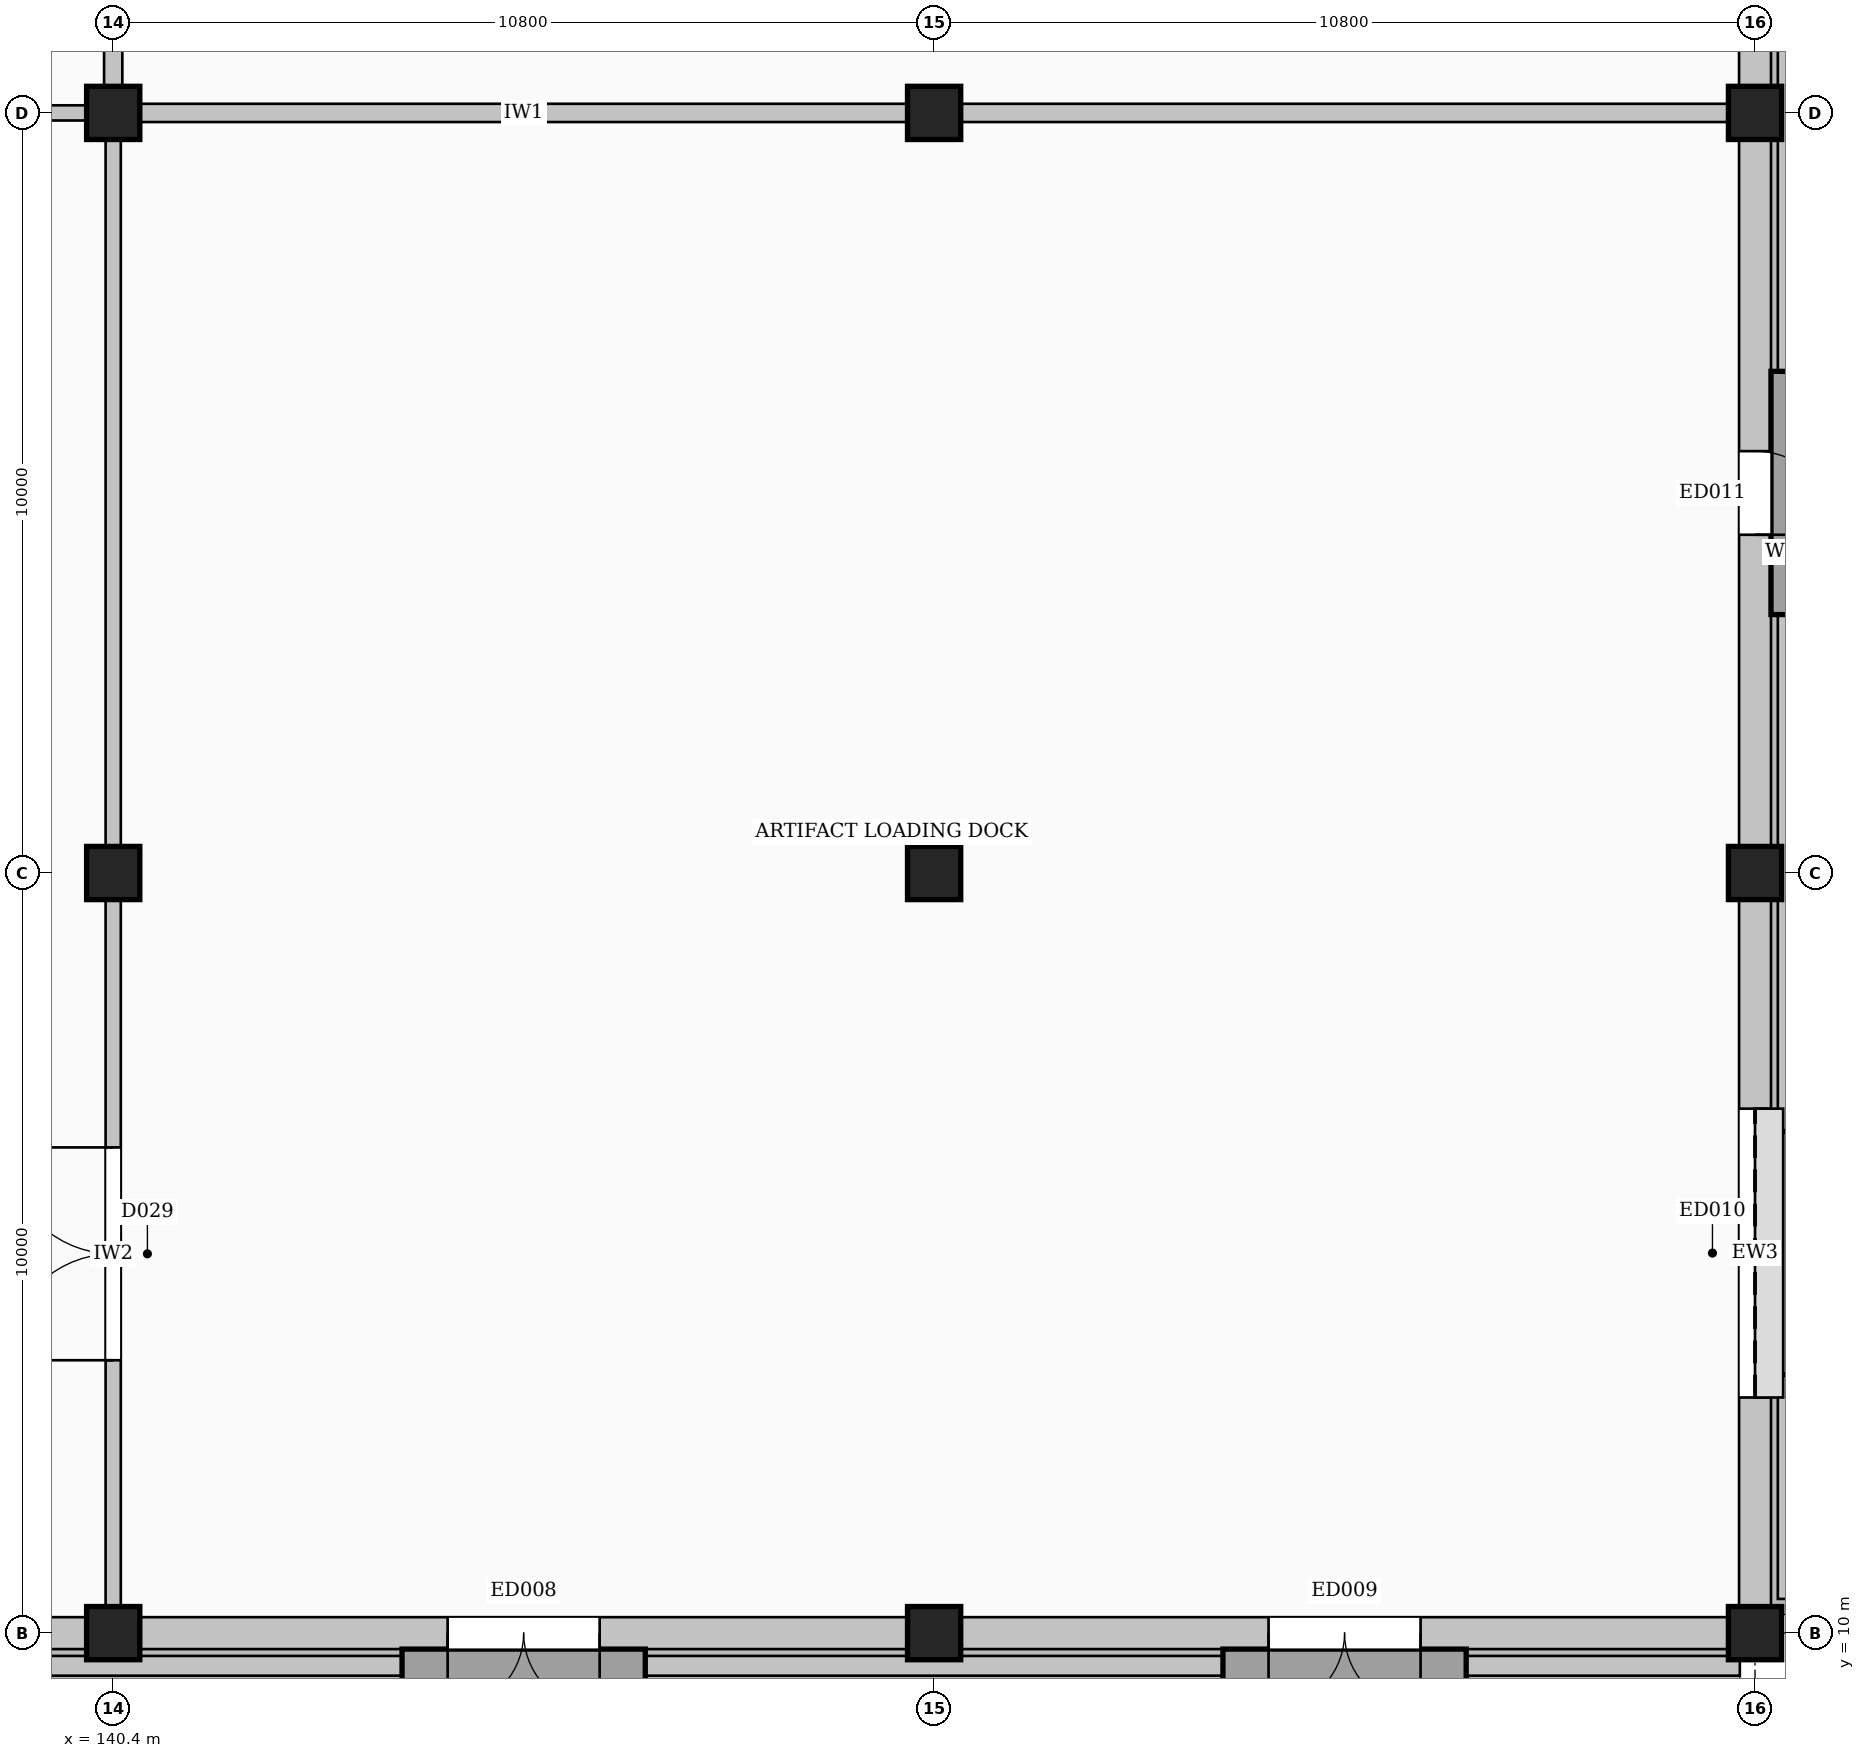
"""IFC4 building model, lengths in metres.
Left out: names, types, materials, properties, quantities, classifications, styles, units other than length and angle.
Written with IfcOpenShell. Run it as: python <this file> out.ifc"""

import sys

from ifc_helpers import new_model, si_unit, direction, frame, frame_2d, origin, origin_2d, place, context, subcontext, project, spatial, rectangle, extrude, element, fill, save


model = new_model("IFC4")
c1 = context("Model", 3, precision=1e-05, world=origin(), true_north=direction((0.0, 1.0)))
c2 = subcontext(c1, "Body", "Model", "MODEL_VIEW")
j1 = project(units=[si_unit("LENGTHUNIT", "METRE"), si_unit("PLANEANGLEUNIT", "RADIAN")], contexts=[c1])
p1 = place(None, origin())
s1 = spatial("IfcSite", under=j1, at=p1, CompositionType="ELEMENT")
p2 = place(p1, origin())
s2 = spatial("IfcBuilding", under=s1, at=p2, CompositionType="ELEMENT")
p3 = place(p2, origin())
s3 = spatial("IfcBuildingStorey", under=s2, at=p3, CompositionType="ELEMENT", Elevation=0.0)
for number, where, z_axis, x_axis in (
    (1, (140.4, 10.0, 0.0), (0.0, 0.0, 1.0), (1.0, 0.0, 0.0)),
    (2, (140.4, 20.0, 0.0), (0.0, 0.0, 1.0), (1.0, 0.0, 0.0)),
    (3, (140.4, 30.0, 0.0), (0.0, 0.0, 1.0), (1.0, 0.0, 0.0)),
    (4, (151.2, 10.0, 0.0), (0.0, 0.0, 1.0), (1.0, 0.0, 0.0)),
    (5, (151.2, 20.0, 0.0), (0.0, 0.0, 1.0), (1.0, 0.0, 0.0)),
    (6, (151.2, 30.0, 0.0), (0.0, 0.0, 1.0), (1.0, 0.0, 0.0)),
    (7, (162.0, 10.0, 0.0), (0.0, 0.0, 1.0), (1.0, 0.0, 0.0)),
    (8, (162.0, 20.0, 0.0), (0.0, 0.0, 1.0), (1.0, 0.0, 0.0)),
    (9, (162.0, 30.0, 0.0), (0.0, 0.0, 1.0), (1.0, 0.0, 0.0)),
):
    element("IfcColumn", number, at=place(p3, frame(where, z_axis=z_axis, x_axis=x_axis)), inside=s3, PredefinedType="COLUMN", context=c2, shape_type="SweptSolid", body=[
        extrude(rectangle(XDim=0.7, YDim=0.7, at=origin_2d()), origin(), (0.0, 0.0, 1.0), 4.8),
    ])
p4 = place(p3, frame((108.2, 9.57, -1.38), z_axis=(0.0, 0.0, 1.0), x_axis=(1.0, 0.0, 0.0)))
e10 = element("IfcWall", 10, at=p4, inside=s3, PredefinedType="PARAPET", context=c2, shape_type="SweptSolid", body=[
    extrude(rectangle(XDim=53.6, YDim=0.26, at=frame_2d((26.8, 0.0))), origin(), (0.0, 0.0, 1.0), 1.36),
])
p5 = place(p3, frame((162.43, 10.45, -1.38), z_axis=(0.0, 0.0, 1.0), x_axis=(0.0, 1.0, 0.0)))
e11 = element("IfcWall", 11, at=p5, inside=s3, PredefinedType="PARAPET", context=c2, shape_type="SweptSolid", body=[
    extrude(rectangle(XDim=27.55, YDim=0.26, at=frame_2d((13.775, 0.0))), origin(), (0.0, 0.0, 1.0), 2.78),
])
p6 = place(p3, frame((129.745, 10.0, 0.0), z_axis=(0.0, 0.0, 1.0), x_axis=(1.0, 0.0, 0.0)))
e12 = element("IfcWall", 12, at=p6, inside=s3, PredefinedType="STANDARD", context=c2, shape_type="SweptSolid", body=[
    extrude(rectangle(XDim=10.51, YDim=0.42, at=frame_2d((5.255, 0.0))), origin(), (0.0, 0.0, 1.0), 3.819),
])
p7 = place(p6, frame((4.255, 0.0, 0.0)))
e13 = element("IfcOpeningElement", 13, at=p7, cuts=e12, PredefinedType="OPENING", context=c2, shape_type="SweptSolid", body=[
    extrude(rectangle(XDim=2.0, YDim=2.3, at=frame_2d((1.0, 1.15))), frame((0.0, 0.22, 0.0), z_axis=(0.0, -1.0, 0.0), x_axis=(1.0, 0.0, 0.0)), (0.0, 0.0, 1.0), 0.44),
])
p8 = place(p3, frame((140.545, 10.0, 0.0), z_axis=(0.0, 0.0, 1.0), x_axis=(1.0, 0.0, 0.0)))
e14 = element("IfcWall", 14, at=p8, inside=s3, PredefinedType="STANDARD", context=c2, shape_type="SweptSolid", body=[
    extrude(rectangle(XDim=10.51, YDim=0.42, at=frame_2d((5.255, 0.0))), origin(), (0.0, 0.0, 1.0), 3.819),
])
p9 = place(p8, frame((4.255, 0.0, 0.0)))
e15 = element("IfcOpeningElement", 15, at=p9, cuts=e14, PredefinedType="OPENING", context=c2, shape_type="SweptSolid", body=[
    extrude(rectangle(XDim=2.0, YDim=2.3, at=frame_2d((1.0, 1.15))), frame((0.0, 0.22, 0.0), z_axis=(0.0, -1.0, 0.0), x_axis=(1.0, 0.0, 0.0)), (0.0, 0.0, 1.0), 0.44),
])
p10 = place(p3, frame((151.345, 10.0, 0.0), z_axis=(0.0, 0.0, 1.0), x_axis=(1.0, 0.0, 0.0)))
e16 = element("IfcWall", 16, at=p10, inside=s3, PredefinedType="STANDARD", context=c2, shape_type="SweptSolid", body=[
    extrude(rectangle(XDim=10.51, YDim=0.42, at=frame_2d((5.255, 0.0))), origin(), (0.0, 0.0, 1.0), 4.13),
])
p11 = place(p10, frame((4.255, 0.0, 0.0)))
e17 = element("IfcOpeningElement", 17, at=p11, cuts=e16, PredefinedType="OPENING", context=c2, shape_type="SweptSolid", body=[
    extrude(rectangle(XDim=2.0, YDim=2.3, at=frame_2d((1.0, 1.15))), frame((0.0, 0.22, 0.0), z_axis=(0.0, -1.0, 0.0), x_axis=(1.0, 0.0, 0.0)), (0.0, 0.0, 1.0), 0.44),
])
p12 = place(p3, frame((162.0, 10.145, 0.0), z_axis=(0.0, 0.0, 1.0), x_axis=(0.0, 1.0, 0.0)))
e18 = element("IfcWall", 18, at=p12, inside=s3, PredefinedType="STANDARD", context=c2, shape_type="SweptSolid", body=[
    extrude(rectangle(XDim=9.71, YDim=0.42, at=frame_2d((4.855, 0.0))), origin(), (0.0, 0.0, 1.0), 4.13),
])
p13 = place(p12, frame((2.955, 0.0, 0.0)))
e19 = element("IfcOpeningElement", 19, at=p13, cuts=e18, PredefinedType="OPENING", context=c2, shape_type="SweptSolid", body=[
    extrude(rectangle(XDim=3.8, YDim=4.0, at=frame_2d((1.9, 2.0))), frame((0.0, 0.22, 0.0), z_axis=(0.0, -1.0, 0.0), x_axis=(1.0, 0.0, 0.0)), (0.0, 0.0, 1.0), 0.44),
])
p14 = place(p3, frame((162.0, 20.145, 0.0), z_axis=(0.0, 0.0, 1.0), x_axis=(0.0, 1.0, 0.0)))
e20 = element("IfcWall", 20, at=p14, inside=s3, PredefinedType="STANDARD", context=c2, shape_type="SweptSolid", body=[
    extrude(rectangle(XDim=9.71, YDim=0.42, at=frame_2d((4.855, 0.0))), origin(), (0.0, 0.0, 1.0), 4.13),
])
p15 = place(p14, frame((4.305, 0.0, 0.0)))
e21 = element("IfcOpeningElement", 21, at=p15, cuts=e20, PredefinedType="OPENING", context=c2, shape_type="SweptSolid", body=[
    extrude(rectangle(XDim=1.1, YDim=2.2, at=frame_2d((0.55, 1.1))), frame((0.0, 0.22, 0.0), z_axis=(0.0, -1.0, 0.0), x_axis=(1.0, 0.0, 0.0)), (0.0, 0.0, 1.0), 0.44),
])
p16 = place(p3, frame((162.0, 30.145, 0.0), z_axis=(0.0, 0.0, 1.0), x_axis=(0.0, 1.0, 0.0)))
e22 = element("IfcWall", 22, at=p16, inside=s3, PredefinedType="STANDARD", context=c2, shape_type="SweptSolid", body=[
    extrude(rectangle(XDim=9.71, YDim=0.42, at=frame_2d((4.855, 0.0))), origin(), (0.0, 0.0, 1.0), 4.13),
])
p17 = place(p16, frame((4.055, 0.0, 1.2)))
e23 = element("IfcOpeningElement", 23, at=p17, cuts=e22, PredefinedType="OPENING", context=c2, shape_type="SweptSolid", body=[
    extrude(rectangle(XDim=1.6, YDim=1.8, at=frame_2d((0.8, 0.9))), frame((0.0, 0.22, 0.0), z_axis=(0.0, -1.0, 0.0), x_axis=(1.0, 0.0, 0.0)), (0.0, 0.0, 1.0), 0.44),
])
p18 = place(p3, frame((129.8, 30.0, 0.0), z_axis=(0.0, 0.0, 1.0), x_axis=(1.0, 0.0, 0.0)))
e24 = element("IfcWall", 24, at=p18, inside=s3, PredefinedType="SOLIDWALL", context=c2, shape_type="SweptSolid", body=[
    extrude(rectangle(XDim=10.4, YDim=0.2, at=frame_2d((5.2, 0.0))), origin(), (0.0, 0.0, 1.0), 3.819),
])
p19 = place(p3, frame((140.4, 10.18, 0.0), z_axis=(0.0, 0.0, 1.0), x_axis=(0.0, 1.0, 0.0)))
e25 = element("IfcWall", 25, at=p19, inside=s3, PredefinedType="SOLIDWALL", context=c2, shape_type="SweptSolid", body=[
    extrude(rectangle(XDim=9.62, YDim=0.2, at=frame_2d((4.81, 0.0))), origin(), (0.0, 0.0, 1.0), 3.97),
])
p20 = place(p19, frame((3.41, 0.0, 0.0)))
e26 = element("IfcOpeningElement", 26, at=p20, cuts=e25, PredefinedType="OPENING", context=c2, shape_type="SweptSolid", body=[
    extrude(rectangle(XDim=2.8, YDim=2.9, at=frame_2d((1.4, 1.45))), frame((0.0, 0.11, 0.0), z_axis=(0.0, -1.0, 0.0), x_axis=(1.0, 0.0, 0.0)), (0.0, 0.0, 1.0), 0.22),
])
p21 = place(p3, frame((140.4, 20.2, 0.0), z_axis=(0.0, 0.0, 1.0), x_axis=(0.0, 1.0, 0.0)))
e27 = element("IfcWall", 27, at=p21, inside=s3, PredefinedType="SOLIDWALL", context=c2, shape_type="SweptSolid", body=[
    extrude(rectangle(XDim=9.6, YDim=0.2, at=frame_2d((4.8, 0.0))), origin(), (0.0, 0.0, 1.0), 3.97),
])
p22 = place(p3, frame((140.6, 30.0, 0.0), z_axis=(0.0, 0.0, 1.0), x_axis=(1.0, 0.0, 0.0)))
e28 = element("IfcWall", 28, at=p22, inside=s3, PredefinedType="SOLIDWALL", context=c2, shape_type="SweptSolid", body=[
    extrude(rectangle(XDim=10.4, YDim=0.24, at=frame_2d((5.2, 0.0))), origin(), (0.0, 0.0, 1.0), 3.819),
])
p23 = place(p3, frame((151.4, 30.0, 0.0), z_axis=(0.0, 0.0, 1.0), x_axis=(1.0, 0.0, 0.0)))
e29 = element("IfcWall", 29, at=p23, inside=s3, PredefinedType="SOLIDWALL", context=c2, shape_type="SweptSolid", body=[
    extrude(rectangle(XDim=10.42, YDim=0.24, at=frame_2d((5.21, 0.0))), origin(), (0.0, 0.0, 1.0), 4.13),
])
p24 = place(p3, frame((140.4, 30.2, 0.0), z_axis=(0.0, 0.0, 1.0), x_axis=(0.0, 1.0, 0.0)))
e30 = element("IfcWall", 30, at=p24, inside=s3, PredefinedType="SOLIDWALL", context=c2, shape_type="SweptSolid", body=[
    extrude(rectangle(XDim=9.62, YDim=0.24, at=frame_2d((4.81, 0.0))), origin(), (0.0, 0.0, 1.0), 3.97),
])
p25 = place(p9, frame((2.0, 0.0, 0.0), z_axis=(0.0, 0.0, 1.0), x_axis=(-1.0, 0.0, 0.0)))
e31 = element("IfcDoor", 31, at=p25, inside=s3, OperationType="DOUBLE_DOOR_SINGLE_SWING", PredefinedType="DOOR", context=c2, shape_type="SweptSolid", body=[
    extrude(rectangle(XDim=2.0, YDim=2.3, at=frame_2d((1.0, 1.15))), frame((0.0, 0.025, 0.0), z_axis=(0.0, -1.0, 0.0), x_axis=(1.0, 0.0, 0.0)), (0.0, 0.0, 1.0), 0.05),
])
fill(e15, e31)
p26 = place(p11, frame((2.0, 0.0, 0.0), z_axis=(0.0, 0.0, 1.0), x_axis=(-1.0, 0.0, 0.0)))
e32 = element("IfcDoor", 32, at=p26, inside=s3, OperationType="DOUBLE_DOOR_SINGLE_SWING", PredefinedType="DOOR", context=c2, shape_type="SweptSolid", body=[
    extrude(rectangle(XDim=2.0, YDim=2.3, at=frame_2d((1.0, 1.15))), frame((0.0, 0.025, 0.0), z_axis=(0.0, -1.0, 0.0), x_axis=(1.0, 0.0, 0.0)), (0.0, 0.0, 1.0), 0.05),
])
fill(e17, e32)
p27 = place(p13, frame((3.8, 0.0, 0.0), z_axis=(0.0, 0.0, 1.0), x_axis=(-1.0, 0.0, 0.0)))
e33 = element("IfcDoor", 33, at=p27, inside=s3, OperationType="ROLLINGUP", PredefinedType="GATE", context=c2, shape_type="SweptSolid", body=[
    extrude(rectangle(XDim=3.8, YDim=4.0, at=frame_2d((1.9, 2.0))), frame((0.0, 0.025, 0.0), z_axis=(0.0, -1.0, 0.0), x_axis=(1.0, 0.0, 0.0)), (0.0, 0.0, 1.0), 0.05),
])
fill(e19, e33)
p28 = place(p15, frame((1.1, 0.0, 0.0), z_axis=(0.0, 0.0, 1.0), x_axis=(-1.0, 0.0, 0.0)))
e34 = element("IfcDoor", 34, at=p28, inside=s3, OperationType="SINGLE_SWING_LEFT", PredefinedType="DOOR", context=c2, shape_type="SweptSolid", body=[
    extrude(rectangle(XDim=1.1, YDim=2.2, at=frame_2d((0.55, 1.1))), frame((0.0, 0.025, 0.0), z_axis=(0.0, -1.0, 0.0), x_axis=(1.0, 0.0, 0.0)), (0.0, 0.0, 1.0), 0.05),
])
fill(e21, e34)
p29 = place(p20, origin())
e35 = element("IfcDoor", 35, at=p29, inside=s3, OperationType="DOUBLE_DOOR_SINGLE_SWING", PredefinedType="GATE", context=c2, shape_type="SweptSolid", body=[
    extrude(rectangle(XDim=2.8, YDim=2.9, at=frame_2d((1.4, 1.45))), frame((0.0, 0.025, 0.0), z_axis=(0.0, -1.0, 0.0), x_axis=(1.0, 0.0, 0.0)), (0.0, 0.0, 1.0), 0.05),
])
fill(e26, e35)
save(model, sys.argv[1])
